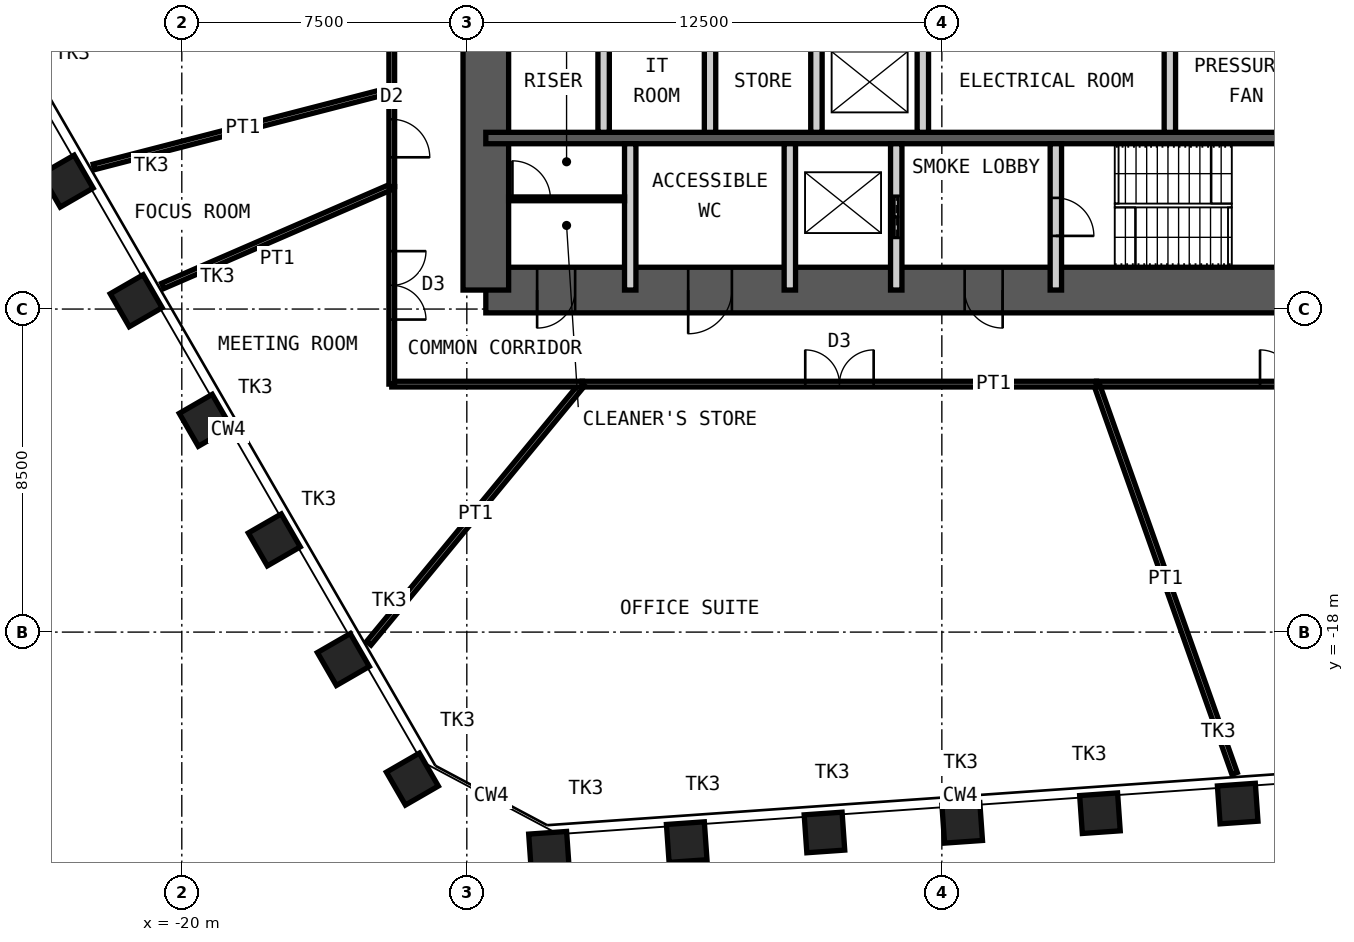
"""IFC4 building model, lengths in metres.
Left out: names, types, materials, properties, quantities, classifications, styles, units other than length and angle.
Written with IfcOpenShell. Run it as: python <this file> out.ifc"""

import sys

from ifc_helpers import new_model, si_unit, direction, frame, frame_2d, origin, origin_2d, place, context, subcontext, project, spatial, rectangle, hollow_rectangle, extrude, element, fill, save


model = new_model("IFC4")
c1 = context("Model", 3, precision=1e-05, world=origin(), true_north=direction((0.0, 1.0)))
c2 = subcontext(c1, "Body", "Model", "MODEL_VIEW")
j1 = project(units=[si_unit("LENGTHUNIT", "METRE"), si_unit("PLANEANGLEUNIT", "RADIAN")], contexts=[c1])
p1 = place(None, origin())
s1 = spatial("IfcSite", under=j1, at=p1, CompositionType="ELEMENT")
p2 = place(p1, origin())
s2 = spatial("IfcBuilding", under=s1, at=p2, CompositionType="ELEMENT")
p3 = place(p2, frame((0.0, 0.0, 251.8)))
s3 = spatial("IfcBuildingStorey", under=s2, at=p3, CompositionType="ELEMENT", Elevation=251.8)
for number, where, z_axis, x_axis in (
    (1, (7.785, -22.512, 0.0), (0.0, 0.0, 1.0), (0.998, 0.07, 0.0)),
    (2, (4.16, -22.765, 0.0), (0.0, 0.0, 1.0), (0.998, 0.07, 0.0)),
    (3, (0.536, -23.019, 0.0), (0.0, 0.0, 1.0), (0.998, 0.07, 0.0)),
    (4, (-3.089, -23.272, 0.0), (0.0, 0.0, 1.0), (0.998, 0.07, 0.0)),
    (5, (-6.714, -23.526, 0.0), (0.0, 0.0, 1.0), (0.998, 0.07, 0.0)),
    (6, (-10.338, -23.779, 0.0), (0.0, 0.0, 1.0), (0.998, 0.07, 0.0)),
    (7, (-13.933, -21.868, 0.0), (0.0, 0.0, 1.0), (0.5, -0.866, 0.0)),
    (8, (-15.749, -18.721, 0.0), (0.0, 0.0, 1.0), (0.5, -0.866, 0.0)),
    (9, (-17.566, -15.574, 0.0), (0.0, 0.0, 1.0), (0.5, -0.866, 0.0)),
    (10, (-19.383, -12.428, 0.0), (0.0, 0.0, 1.0), (0.5, -0.866, 0.0)),
    (11, (-21.2, -9.281, 0.0), (0.0, 0.0, 1.0), (0.5, -0.866, 0.0)),
    (12, (-23.016, -6.134, 0.0), (0.0, 0.0, 1.0), (0.5, -0.866, 0.0)),
):
    element("IfcColumn", number, at=place(p3, frame(where, z_axis=z_axis, x_axis=x_axis)), inside=s3, PredefinedType="COLUMN", context=c2, shape_type="SweptSolid", body=[
        extrude(hollow_rectangle(XDim=1.0, YDim=1.0, WallThickness=0.08, at=origin_2d()), origin(), (0.0, 0.0, 1.0), 4.2),
    ])
p4 = place(p3, frame((-12.0, -9.0, 0.0), z_axis=(0.0, 0.0, 1.0), x_axis=(1.0, 0.0, 0.0)))
e13 = element("IfcWall", 13, at=p4, inside=s3, PredefinedType="SHEAR", context=c2, shape_type="SweptSolid", body=[
    extrude(rectangle(XDim=24.0, YDim=1.2, at=frame_2d((12.0, 0.0))), origin(), (0.0, 0.0, 1.0), 4.2),
])
p5 = place(p4, frame((1.35, 0.0, 0.0)))
e14 = element("IfcOpeningElement", 14, at=p5, cuts=e13, PredefinedType="OPENING", context=c2, shape_type="SweptSolid", body=[
    extrude(rectangle(XDim=1.0, YDim=2.1, at=frame_2d((0.5, 1.05))), frame((0.0, 0.61, 0.0), z_axis=(0.0, -1.0, 0.0), x_axis=(1.0, 0.0, 0.0)), (0.0, 0.0, 1.0), 1.22),
])
p6 = place(p4, frame((5.325, 0.0, 0.0)))
e15 = element("IfcOpeningElement", 15, at=p6, cuts=e13, PredefinedType="OPENING", context=c2, shape_type="SweptSolid", body=[
    extrude(rectangle(XDim=1.15, YDim=2.1, at=frame_2d((0.575, 1.05))), frame((0.0, 0.61, 0.0), z_axis=(0.0, -1.0, 0.0), x_axis=(1.0, 0.0, 0.0)), (0.0, 0.0, 1.0), 1.22),
])
p7 = place(p4, frame((12.6, 0.0, 0.0)))
e16 = element("IfcOpeningElement", 16, at=p7, cuts=e13, PredefinedType="OPENING", context=c2, shape_type="SweptSolid", body=[
    extrude(rectangle(XDim=1.0, YDim=2.1, at=frame_2d((0.5, 1.05))), frame((0.0, 0.61, 0.0), z_axis=(0.0, -1.0, 0.0), x_axis=(1.0, 0.0, 0.0)), (0.0, 0.0, 1.0), 1.22),
])
p8 = place(p3, frame((-12.0, -9.0, 0.0), z_axis=(0.0, 0.0, 1.0), x_axis=(0.0, 1.0, 0.0)))
e17 = element("IfcWall", 17, at=p8, inside=s3, PredefinedType="SHEAR", context=c2, shape_type="SweptSolid", body=[
    extrude(rectangle(XDim=18.0, YDim=1.2, at=frame_2d((9.0, 0.0))), origin(), (0.0, 0.0, 1.0), 4.2),
])
p9 = place(p8, frame((8.1, 0.0, 0.0)))
e18 = element("IfcOpeningElement", 18, at=p9, cuts=e17, PredefinedType="OPENING", context=c2, shape_type="SweptSolid", body=[
    extrude(rectangle(XDim=1.8, YDim=2.1, at=frame_2d((0.9, 1.05))), frame((0.0, 0.61, 0.0), z_axis=(0.0, -1.0, 0.0), x_axis=(1.0, 0.0, 0.0)), (0.0, 0.0, 1.0), 1.22),
])
p10 = place(p3, frame((-12.0, -5.0, 0.0), z_axis=(0.0, 0.0, 1.0), x_axis=(1.0, 0.0, 0.0)))
e19 = element("IfcWall", 19, at=p10, inside=s3, PredefinedType="SHEAR", context=c2, shape_type="SweptSolid", body=[
    extrude(rectangle(XDim=24.0, YDim=0.3, at=frame_2d((12.0, 0.0))), origin(), (0.0, 0.0, 1.0), 4.2),
])
for number, where, z_axis, x_axis in (
    (20, (-8.9, -4.85, 0.0), (0.0, 0.0, 1.0), (0.0, 1.0, 0.0)),
    (21, (-6.1, -4.85, 0.0), (0.0, 0.0, 1.0), (0.0, 1.0, 0.0)),
    (22, (-3.3, -4.85, 0.0), (0.0, 0.0, 1.0), (0.0, 1.0, 0.0)),
    (23, (-0.5, -4.85, 0.0), (0.0, 0.0, 1.0), (0.0, 1.0, 0.0)),
    (24, (6.0, -4.85, 0.0), (0.0, 0.0, 1.0), (0.0, 1.0, 0.0)),
):
    element("IfcWall", number, at=place(p3, frame(where, z_axis=z_axis, x_axis=x_axis)), inside=s3, PredefinedType="PARTITIONING", context=c2, shape_type="SweptSolid", body=[
        extrude(rectangle(XDim=2.65, YDim=0.3, at=frame_2d((1.325, 0.0))), origin(), (0.0, 0.0, 1.0), 3.98),
    ])
for number, where, z_axis, x_axis in (
    (25, (-8.2, -9.0, 0.0), (0.0, 0.0, 1.0), (0.0, 1.0, 0.0)),
    (26, (-4.0, -9.0, 0.0), (0.0, 0.0, 1.0), (0.0, 1.0, 0.0)),
):
    element("IfcWall", number, at=place(p3, frame(where, z_axis=z_axis, x_axis=x_axis)), inside=s3, PredefinedType="PARTITIONING", context=c2, shape_type="SweptSolid", body=[
        extrude(rectangle(XDim=3.85, YDim=0.3, at=frame_2d((1.925, 0.0))), origin(), (0.0, 0.0, 1.0), 3.98),
    ])
p11 = place(p3, frame((-1.2, -9.0, 0.0), z_axis=(0.0, 0.0, 1.0), x_axis=(0.0, 1.0, 0.0)))
e27 = element("IfcWall", 27, at=p11, inside=s3, PredefinedType="PARTITIONING", context=c2, shape_type="SweptSolid", body=[
    extrude(rectangle(XDim=3.85, YDim=0.3, at=frame_2d((1.925, 0.0))), origin(), (0.0, 0.0, 1.0), 3.98),
])
p12 = place(p11, frame((1.375, 0.0, 0.0)))
e28 = element("IfcOpeningElement", 28, at=p12, cuts=e27, PredefinedType="OPENING", context=c2, shape_type="SweptSolid", body=[
    extrude(rectangle(XDim=1.1, YDim=2.4, at=frame_2d((0.55, 1.2))), frame((0.0, 0.16, 0.0), z_axis=(0.0, -1.0, 0.0), x_axis=(1.0, 0.0, 0.0)), (0.0, 0.0, 1.0), 0.32),
])
p13 = place(p3, frame((3.0, -9.0, 0.0), z_axis=(0.0, 0.0, 1.0), x_axis=(0.0, 1.0, 0.0)))
e29 = element("IfcWall", 29, at=p13, inside=s3, PredefinedType="PARTITIONING", context=c2, shape_type="SweptSolid", body=[
    extrude(rectangle(XDim=3.85, YDim=0.3, at=frame_2d((1.925, 0.0))), origin(), (0.0, 0.0, 1.0), 3.98),
])
p14 = place(p13, frame((1.425, 0.0, 0.0)))
e30 = element("IfcOpeningElement", 30, at=p14, cuts=e29, PredefinedType="OPENING", context=c2, shape_type="SweptSolid", body=[
    extrude(rectangle(XDim=1.0, YDim=2.1, at=frame_2d((0.5, 1.05))), frame((0.0, 0.16, 0.0), z_axis=(0.0, -1.0, 0.0), x_axis=(1.0, 0.0, 0.0)), (0.0, 0.0, 1.0), 0.32),
])
p15 = place(p3, frame((-11.4, -6.6, 0.0), z_axis=(0.0, 0.0, 1.0), x_axis=(1.0, 0.0, 0.0)))
e31 = element("IfcWall", 31, at=p15, inside=s3, PredefinedType="PARTITIONING", context=c2, shape_type="SweptSolid", body=[
    extrude(rectangle(XDim=3.05, YDim=0.1, at=frame_2d((1.525, 0.0))), origin(), (0.0, 0.0, 1.0), 3.98),
])
p16 = place(p15, frame((0.1, 0.0, 0.0)))
e32 = element("IfcOpeningElement", 32, at=p16, cuts=e31, PredefinedType="OPENING", context=c2, shape_type="SweptSolid", body=[
    extrude(rectangle(XDim=1.0, YDim=2.4, at=frame_2d((0.5, 1.2))), frame((0.0, 0.06, 0.0), z_axis=(0.0, -1.0, 0.0), x_axis=(1.0, 0.0, 0.0)), (0.0, 0.0, 1.0), 0.12),
])
p17 = place(p3, frame((14.475, -11.475, 0.0), z_axis=(0.0, 0.0, 1.0), x_axis=(-1.0, 0.0, 0.0)))
e33 = element("IfcWall", 33, at=p17, inside=s3, PredefinedType="PARTITIONING", context=c2, shape_type="SweptSolid", body=[
    extrude(rectangle(XDim=10.406, YDim=0.15, at=frame_2d((5.203, 0.0))), origin(), (0.0, 0.0, 1.0), 3.92),
])
p18 = place(p17, frame((4.303, 0.0, 0.0)))
e34 = element("IfcOpeningElement", 34, at=p18, cuts=e33, PredefinedType="OPENING", context=c2, shape_type="SweptSolid", body=[
    extrude(rectangle(XDim=1.8, YDim=2.4, at=frame_2d((0.9, 1.2))), frame((0.0, 0.085, 0.0), z_axis=(0.0, -1.0, 0.0), x_axis=(1.0, 0.0, 0.0)), (0.0, 0.0, 1.0), 0.17),
])
p19 = place(p3, frame((7.703, -21.719, 0.0), z_axis=(0.0, 0.0, 1.0), x_axis=(-0.334269551553, 0.942477515331, 0.0)))
e35 = element("IfcWall", 35, at=p19, inside=s3, PredefinedType="PARTITIONING", context=c2, shape_type="SweptSolid", body=[
    extrude(rectangle(XDim=10.869, YDim=0.15, at=frame_2d((5.435, 0.0))), origin(), (0.0, 0.0, 1.0), 2.72),
])
p20 = place(p3, frame((4.07, -11.475, 0.0), z_axis=(0.0, 0.0, 1.0), x_axis=(-1.0, 0.0, 0.0)))
e36 = element("IfcWall", 36, at=p20, inside=s3, PredefinedType="PARTITIONING", context=c2, shape_type="SweptSolid", body=[
    extrude(rectangle(XDim=13.528, YDim=0.15, at=frame_2d((6.764, 0.0))), origin(), (0.0, 0.0, 1.0), 3.92),
])
p21 = place(p20, frame((5.864, 0.0, 0.0)))
e37 = element("IfcOpeningElement", 37, at=p21, cuts=e36, PredefinedType="OPENING", context=c2, shape_type="SweptSolid", body=[
    extrude(rectangle(XDim=1.8, YDim=2.4, at=frame_2d((0.9, 1.2))), frame((0.0, 0.085, 0.0), z_axis=(0.0, -1.0, 0.0), x_axis=(1.0, 0.0, 0.0)), (0.0, 0.0, 1.0), 0.17),
])
p22 = place(p3, frame((-15.08, -18.294, 0.0), z_axis=(0.0, 0.0, 1.0), x_axis=(0.636052894953, 0.771645459277, 0.0)))
e38 = element("IfcWall", 38, at=p22, inside=s3, PredefinedType="PARTITIONING", context=c2, shape_type="SweptSolid", body=[
    extrude(rectangle(XDim=8.837, YDim=0.15, at=frame_2d((4.418, 0.0))), origin(), (0.0, 0.0, 1.0), 2.72),
])
p23 = place(p3, frame((-9.459, -11.475, 0.0), z_axis=(0.0, 0.0, 1.0), x_axis=(-1.0, 0.0, 0.0)))
e39 = element("IfcWall", 39, at=p23, inside=s3, PredefinedType="PARTITIONING", context=c2, shape_type="SweptSolid", body=[
    extrude(rectangle(XDim=5.016, YDim=0.15, at=frame_2d((2.508, 0.0))), origin(), (0.0, 0.0, 1.0), 3.92),
])
p24 = place(p3, frame((-14.475, -11.475, 0.0), z_axis=(0.0, 0.0, 1.0), x_axis=(0.0, 1.0, 0.0)))
e40 = element("IfcWall", 40, at=p24, inside=s3, PredefinedType="PARTITIONING", context=c2, shape_type="SweptSolid", body=[
    extrude(rectangle(XDim=5.198, YDim=0.15, at=frame_2d((2.599, 0.0))), origin(), (0.0, 0.0, 1.0), 3.92),
])
p25 = place(p24, frame((1.699, 0.0, 0.0)))
e41 = element("IfcOpeningElement", 41, at=p25, cuts=e40, PredefinedType="OPENING", context=c2, shape_type="SweptSolid", body=[
    extrude(rectangle(XDim=1.8, YDim=2.4, at=frame_2d((0.9, 1.2))), frame((0.0, 0.085, 0.0), z_axis=(0.0, -1.0, 0.0), x_axis=(1.0, 0.0, 0.0)), (0.0, 0.0, 1.0), 0.17),
])
p26 = place(p3, frame((-20.502, -8.891, 0.0), z_axis=(0.0, 0.0, 1.0), x_axis=(0.917431289744, 0.397894242982, 0.0)))
e42 = element("IfcWall", 42, at=p26, inside=s3, PredefinedType="PARTITIONING", context=c2, shape_type="SweptSolid", body=[
    extrude(rectangle(XDim=6.569, YDim=0.15, at=frame_2d((3.285, 0.0))), origin(), (0.0, 0.0, 1.0), 2.72),
])
p27 = place(p3, frame((-14.475, -6.278, 0.0), z_axis=(0.0, 0.0, 1.0), x_axis=(0.0, 1.0, 0.0)))
e43 = element("IfcWall", 43, at=p27, inside=s3, PredefinedType="PARTITIONING", context=c2, shape_type="SweptSolid", body=[
    extrude(rectangle(XDim=2.542, YDim=0.15, at=frame_2d((1.271, 0.0))), origin(), (0.0, 0.0, 1.0), 3.92),
])
p28 = place(p27, frame((0.771, 0.0, 0.0)))
e44 = element("IfcOpeningElement", 44, at=p28, cuts=e43, PredefinedType="OPENING", context=c2, shape_type="SweptSolid", body=[
    extrude(rectangle(XDim=1.0, YDim=2.4, at=frame_2d((0.5, 1.2))), frame((0.0, 0.085, 0.0), z_axis=(0.0, -1.0, 0.0), x_axis=(1.0, 0.0, 0.0)), (0.0, 0.0, 1.0), 0.17),
])
p29 = place(p3, frame((-22.313, -5.759, 0.0), z_axis=(0.0, 0.0, 1.0), x_axis=(0.968265788926, 0.249922712042, 0.0)))
e45 = element("IfcWall", 45, at=p29, inside=s3, PredefinedType="PARTITIONING", context=c2, shape_type="SweptSolid", body=[
    extrude(rectangle(XDim=8.095, YDim=0.15, at=frame_2d((4.048, 0.0))), origin(), (0.0, 0.0, 1.0), 2.72),
])
p30 = place(p3, frame((-14.475, -3.736, 0.0), z_axis=(0.0, 0.0, 1.0), x_axis=(0.0, 1.0, 0.0)))
e46 = element("IfcWall", 46, at=p30, inside=s3, PredefinedType="PARTITIONING", context=c2, shape_type="SweptSolid", body=[
    extrude(rectangle(XDim=6.412, YDim=0.15, at=frame_2d((3.206, 0.0))), origin(), (0.0, 0.0, 1.0), 3.92),
])
p31 = place(p30, frame((2.706, 0.0, 0.0)))
e47 = element("IfcOpeningElement", 47, at=p31, cuts=e46, PredefinedType="OPENING", context=c2, shape_type="SweptSolid", body=[
    extrude(rectangle(XDim=1.0, YDim=2.4, at=frame_2d((0.5, 1.2))), frame((0.0, 0.085, 0.0), z_axis=(0.0, -1.0, 0.0), x_axis=(1.0, 0.0, 0.0)), (0.0, 0.0, 1.0), 0.17),
])
p32 = place(p5, origin())
e48 = element("IfcDoor", 48, at=p32, inside=s3, OperationType="SINGLE_SWING_LEFT", PredefinedType="DOOR", context=c2, shape_type="SweptSolid", body=[
    extrude(rectangle(XDim=1.0, YDim=2.1, at=frame_2d((0.5, 1.05))), frame((0.0, 0.025, 0.0), z_axis=(0.0, -1.0, 0.0), x_axis=(1.0, 0.0, 0.0)), (0.0, 0.0, 1.0), 0.05),
])
fill(e14, e48)
p33 = place(p6, origin())
e49 = element("IfcDoor", 49, at=p33, inside=s3, OperationType="SINGLE_SWING_LEFT", PredefinedType="DOOR", context=c2, shape_type="SweptSolid", body=[
    extrude(rectangle(XDim=1.15, YDim=2.1, at=frame_2d((0.575, 1.05))), frame((0.0, 0.025, 0.0), z_axis=(0.0, -1.0, 0.0), x_axis=(1.0, 0.0, 0.0)), (0.0, 0.0, 1.0), 0.05),
])
fill(e15, e49)
p34 = place(p7, origin())
e50 = element("IfcDoor", 50, at=p34, inside=s3, OperationType="SINGLE_SWING_RIGHT", PredefinedType="DOOR", context=c2, shape_type="SweptSolid", body=[
    extrude(rectangle(XDim=1.0, YDim=2.1, at=frame_2d((0.5, 1.05))), frame((0.0, 0.025, 0.0), z_axis=(0.0, -1.0, 0.0), x_axis=(1.0, 0.0, 0.0)), (0.0, 0.0, 1.0), 0.05),
])
fill(e16, e50)
p35 = place(p14, origin())
e51 = element("IfcDoor", 51, at=p35, inside=s3, OperationType="SINGLE_SWING_LEFT", PredefinedType="DOOR", context=c2, shape_type="SweptSolid", body=[
    extrude(rectangle(XDim=1.0, YDim=2.1, at=frame_2d((0.5, 1.05))), frame((0.0, 0.025, 0.0), z_axis=(0.0, -1.0, 0.0), x_axis=(1.0, 0.0, 0.0)), (0.0, 0.0, 1.0), 0.05),
])
fill(e30, e51)
p36 = place(p12, origin())
e52 = element("IfcDoor", 52, at=p36, inside=s3, OperationType="DOUBLE_DOOR_SLIDING", PredefinedType="DOOR", context=c2, shape_type="SweptSolid", body=[
    extrude(rectangle(XDim=1.1, YDim=2.4, at=frame_2d((0.55, 1.2))), frame((0.0, 0.025, 0.0), z_axis=(0.0, -1.0, 0.0), x_axis=(1.0, 0.0, 0.0)), (0.0, 0.0, 1.0), 0.05),
])
fill(e28, e52)
p37 = place(p16, origin())
e53 = element("IfcDoor", 53, at=p37, inside=s3, OperationType="SINGLE_SWING_RIGHT", PredefinedType="DOOR", context=c2, shape_type="SweptSolid", body=[
    extrude(rectangle(XDim=1.0, YDim=2.4, at=frame_2d((0.5, 1.2))), frame((0.0, 0.025, 0.0), z_axis=(0.0, -1.0, 0.0), x_axis=(1.0, 0.0, 0.0)), (0.0, 0.0, 1.0), 0.05),
])
fill(e32, e53)
p38 = place(p18, origin())
e54 = element("IfcDoor", 54, at=p38, inside=s3, OperationType="DOUBLE_DOOR_DOUBLE_SWING", PredefinedType="DOOR", context=c2, shape_type="SweptSolid", body=[
    extrude(rectangle(XDim=1.8, YDim=2.4, at=frame_2d((0.9, 1.2))), frame((0.0, 0.025, 0.0), z_axis=(0.0, -1.0, 0.0), x_axis=(1.0, 0.0, 0.0)), (0.0, 0.0, 1.0), 0.05),
])
fill(e34, e54)
p39 = place(p21, origin())
e55 = element("IfcDoor", 55, at=p39, inside=s3, OperationType="DOUBLE_DOOR_DOUBLE_SWING", PredefinedType="DOOR", context=c2, shape_type="SweptSolid", body=[
    extrude(rectangle(XDim=1.8, YDim=2.4, at=frame_2d((0.9, 1.2))), frame((0.0, 0.025, 0.0), z_axis=(0.0, -1.0, 0.0), x_axis=(1.0, 0.0, 0.0)), (0.0, 0.0, 1.0), 0.05),
])
fill(e37, e55)
p40 = place(p25, origin())
e56 = element("IfcDoor", 56, at=p40, inside=s3, OperationType="DOUBLE_DOOR_DOUBLE_SWING", PredefinedType="DOOR", context=c2, shape_type="SweptSolid", body=[
    extrude(rectangle(XDim=1.8, YDim=2.4, at=frame_2d((0.9, 1.2))), frame((0.0, 0.025, 0.0), z_axis=(0.0, -1.0, 0.0), x_axis=(1.0, 0.0, 0.0)), (0.0, 0.0, 1.0), 0.05),
])
fill(e41, e56)
p41 = place(p28, origin())
e57 = element("IfcDoor", 57, at=p41, inside=s3, OperationType="SINGLE_SWING_LEFT", PredefinedType="DOOR", context=c2, shape_type="SweptSolid", body=[
    extrude(rectangle(XDim=1.0, YDim=2.4, at=frame_2d((0.5, 1.2))), frame((0.0, 0.025, 0.0), z_axis=(0.0, -1.0, 0.0), x_axis=(1.0, 0.0, 0.0)), (0.0, 0.0, 1.0), 0.05),
])
fill(e44, e57)
save(model, sys.argv[1])
